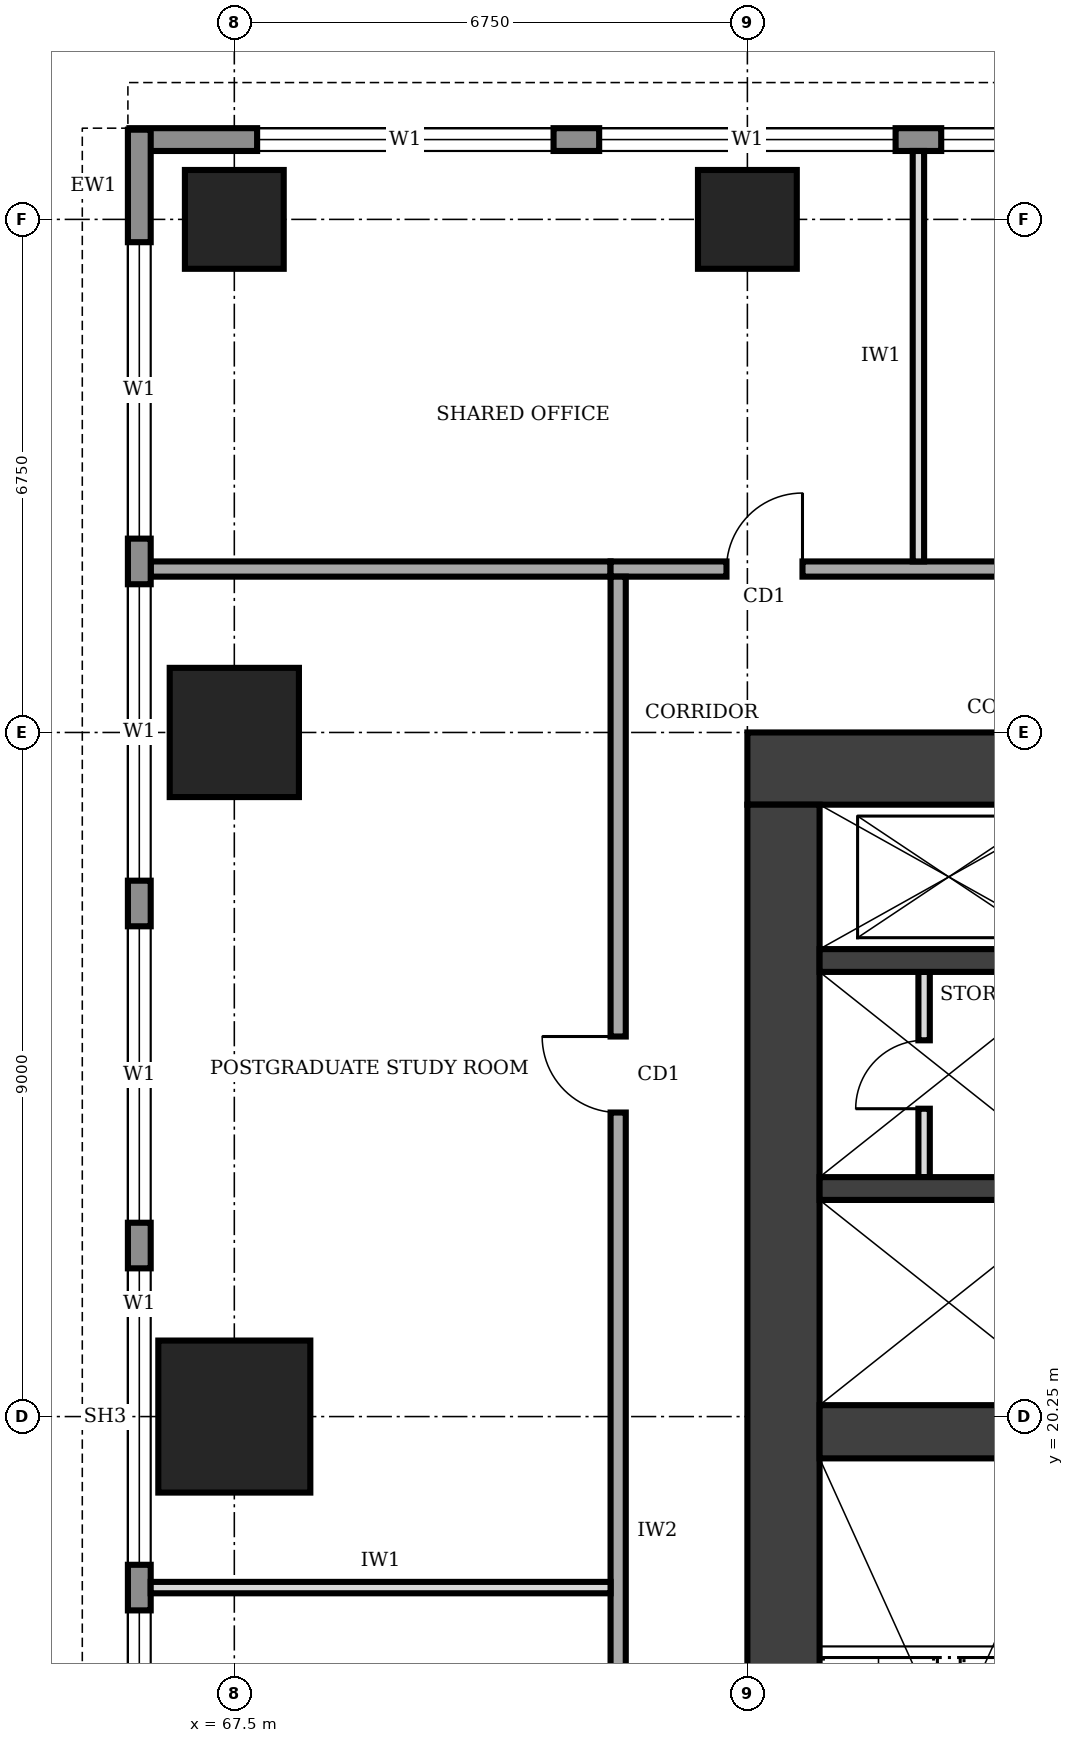
"""IFC4 building model, lengths in metres.
Left out: names, types, materials, properties, quantities, classifications, styles, units other than length and angle.
Written with IfcOpenShell. Run it as: python <this file> out.ifc"""

import sys

from ifc_helpers import new_model, si_unit, direction, frame, frame_2d, origin, origin_2d, place, context, subcontext, project, spatial, rectangle, extrude, element, fill, save


model = new_model("IFC4")
c1 = context("Model", 3, precision=1e-05, world=origin(), true_north=direction((0.0, 1.0)))
c2 = subcontext(c1, "Body", "Model", "MODEL_VIEW")
j1 = project(units=[si_unit("LENGTHUNIT", "METRE"), si_unit("PLANEANGLEUNIT", "RADIAN")], contexts=[c1])
p1 = place(None, origin())
s1 = spatial("IfcSite", under=j1, at=p1, CompositionType="ELEMENT")
p2 = place(p1, origin())
s2 = spatial("IfcBuilding", under=s1, at=p2, CompositionType="ELEMENT")
p3 = place(p2, frame((0.0, 0.0, 205.0)))
s3 = spatial("IfcBuildingStorey", under=s2, at=p3, CompositionType="ELEMENT", Elevation=205.0)
p4 = place(p3, frame((87.75, 28.775, 0.0), z_axis=(0.0, 0.0, 1.0), x_axis=(-1.0, 0.0, 0.0)))
e1 = element("IfcWall", 1, at=p4, inside=s3, PredefinedType="SHEAR", context=c2, shape_type="SweptSolid", body=[
    extrude(rectangle(XDim=13.5, YDim=0.95, at=frame_2d((6.75, 0.0))), origin(), (0.0, 0.0, 1.0), 4.0),
])
p5 = place(p4, frame((4.75, 0.0, 0.0)))
e2 = element("IfcOpeningElement", 2, at=p5, cuts=e1, PredefinedType="OPENING", context=c2, shape_type="SweptSolid", body=[
    extrude(rectangle(XDim=1.8, YDim=2.1, at=frame_2d((0.9, 1.05))), frame((0.0, 0.485, 0.0), z_axis=(0.0, -1.0, 0.0), x_axis=(1.0, 0.0, 0.0)), (0.0, 0.0, 1.0), 0.97),
])
p6 = place(p3, frame((74.725, 28.3, 0.0), z_axis=(0.0, 0.0, 1.0), x_axis=(0.0, -1.0, 0.0)))
e3 = element("IfcWall", 3, at=p6, inside=s3, PredefinedType="SHEAR", context=c2, shape_type="SweptSolid", body=[
    extrude(rectangle(XDim=16.1, YDim=0.95, at=frame_2d((8.05, 0.0))), origin(), (0.0, 0.0, 1.0), 4.0),
])
p7 = place(p3, frame((75.2, 20.05, 0.0), z_axis=(0.0, 0.0, 1.0), x_axis=(1.0, 0.0, 0.0)))
e4 = element("IfcWall", 4, at=p7, inside=s3, PredefinedType="SHEAR", context=c2, shape_type="SweptSolid", body=[
    extrude(rectangle(XDim=3.4, YDim=0.7, at=frame_2d((1.7, 0.0))), origin(), (0.0, 0.0, 1.0), 4.0),
])
for number, where, z_axis, x_axis in (
    (5, (75.2, 23.25, 0.0), (0.0, 0.0, 1.0), (1.0, 0.0, 0.0)),
    (6, (75.2, 26.25, 0.0), (0.0, 0.0, 1.0), (1.0, 0.0, 0.0)),
):
    element("IfcWall", number, at=place(p3, frame(where, z_axis=z_axis, x_axis=x_axis)), inside=s3, PredefinedType="SHEAR", context=c2, shape_type="SweptSolid", body=[
        extrude(rectangle(XDim=3.4, YDim=0.3, at=frame_2d((1.7, 0.0))), origin(), (0.0, 0.0, 1.0), 4.0),
    ])
p8 = place(p3, frame((67.5, 20.25, 0.0), z_axis=(0.0, 0.0, 1.0), x_axis=(1.0, 0.0, 0.0)))
e7 = element("IfcColumn", 7, at=p8, inside=s3, PredefinedType="COLUMN", context=c2, shape_type="SweptSolid", body=[
    extrude(rectangle(XDim=2.0, YDim=2.0, at=origin_2d()), origin(), (0.0, 0.0, 1.0), 4.0),
])
p9 = place(p3, frame((67.5, 29.25, 0.0), z_axis=(0.0, 0.0, 1.0), x_axis=(1.0, 0.0, 0.0)))
e8 = element("IfcColumn", 8, at=p9, inside=s3, PredefinedType="COLUMN", context=c2, shape_type="SweptSolid", body=[
    extrude(rectangle(XDim=1.7, YDim=1.7, at=origin_2d()), origin(), (0.0, 0.0, 1.0), 4.0),
])
for number, where, z_axis, x_axis in (
    (9, (67.5, 36.0, 0.0), (0.0, 0.0, 1.0), (1.0, 0.0, 0.0)),
    (10, (74.25, 36.0, 0.0), (0.0, 0.0, 1.0), (1.0, 0.0, 0.0)),
):
    element("IfcColumn", number, at=place(p3, frame(where, z_axis=z_axis, x_axis=x_axis)), inside=s3, PredefinedType="COLUMN", context=c2, shape_type="SweptSolid", body=[
        extrude(rectangle(XDim=1.3, YDim=1.3, at=origin_2d()), origin(), (0.0, 0.0, 1.0), 4.0),
    ])
p10 = place(p3, frame((96.03, 37.05, 0.0), z_axis=(0.0, 0.0, 1.0), x_axis=(-1.0, 0.0, 0.0)))
e11 = element("IfcWall", 11, at=p10, inside=s3, PredefinedType="STANDARD", context=c2, shape_type="SweptSolid", body=[
    extrude(rectangle(XDim=29.91, YDim=0.3, at=frame_2d((14.955, 0.0))), origin(), (0.0, 0.0, 1.0), 3.75),
])
p11 = place(p10, frame((24.33, 0.0, 0.9)))
e12 = element("IfcOpeningElement", 12, at=p11, cuts=e11, PredefinedType="OPENING", context=c2, shape_type="SweptSolid", body=[
    extrude(rectangle(XDim=3.9, YDim=2.2, at=frame_2d((1.95, 1.1))), frame((0.0, 0.16, 0.0), z_axis=(0.0, -1.0, 0.0), x_axis=(1.0, 0.0, 0.0)), (0.0, 0.0, 1.0), 0.32),
])
p12 = place(p10, frame((19.83, 0.0, 0.9)))
e13 = element("IfcOpeningElement", 13, at=p12, cuts=e11, PredefinedType="OPENING", context=c2, shape_type="SweptSolid", body=[
    extrude(rectangle(XDim=3.9, YDim=2.2, at=frame_2d((1.95, 1.1))), frame((0.0, 0.16, 0.0), z_axis=(0.0, -1.0, 0.0), x_axis=(1.0, 0.0, 0.0)), (0.0, 0.0, 1.0), 0.32),
])
p13 = place(p10, frame((15.33, 0.0, 0.9)))
e14 = element("IfcOpeningElement", 14, at=p13, cuts=e11, PredefinedType="OPENING", context=c2, shape_type="SweptSolid", body=[
    extrude(rectangle(XDim=3.9, YDim=2.2, at=frame_2d((1.95, 1.1))), frame((0.0, 0.16, 0.0), z_axis=(0.0, -1.0, 0.0), x_axis=(1.0, 0.0, 0.0)), (0.0, 0.0, 1.0), 0.32),
])
p14 = place(p10, frame((10.83, 0.0, 0.9)))
e15 = element("IfcOpeningElement", 15, at=p14, cuts=e11, PredefinedType="OPENING", context=c2, shape_type="SweptSolid", body=[
    extrude(rectangle(XDim=3.9, YDim=2.2, at=frame_2d((1.95, 1.1))), frame((0.0, 0.16, 0.0), z_axis=(0.0, -1.0, 0.0), x_axis=(1.0, 0.0, 0.0)), (0.0, 0.0, 1.0), 0.32),
])
p15 = place(p10, frame((6.33, 0.0, 0.9)))
e16 = element("IfcOpeningElement", 16, at=p15, cuts=e11, PredefinedType="OPENING", context=c2, shape_type="SweptSolid", body=[
    extrude(rectangle(XDim=3.9, YDim=2.2, at=frame_2d((1.95, 1.1))), frame((0.0, 0.16, 0.0), z_axis=(0.0, -1.0, 0.0), x_axis=(1.0, 0.0, 0.0)), (0.0, 0.0, 1.0), 0.32),
])
p16 = place(p10, frame((1.83, 0.0, 0.9)))
e17 = element("IfcOpeningElement", 17, at=p16, cuts=e11, PredefinedType="OPENING", context=c2, shape_type="SweptSolid", body=[
    extrude(rectangle(XDim=3.9, YDim=2.2, at=frame_2d((1.95, 1.1))), frame((0.0, 0.16, 0.0), z_axis=(0.0, -1.0, 0.0), x_axis=(1.0, 0.0, 0.0)), (0.0, 0.0, 1.0), 0.32),
])
p17 = place(p3, frame((66.25, 37.18, 0.0), z_axis=(0.0, 0.0, 1.0), x_axis=(0.0, -1.0, 0.0)))
e18 = element("IfcWall", 18, at=p17, inside=s3, PredefinedType="STANDARD", context=c2, shape_type="SweptSolid", body=[
    extrude(rectangle(XDim=33.86, YDim=0.3, at=frame_2d((16.93, 0.0))), origin(), (0.0, 0.0, 1.0), 3.75),
])
p18 = place(p17, frame((28.48, 0.0, 0.9)))
e19 = element("IfcOpeningElement", 19, at=p18, cuts=e18, PredefinedType="OPENING", context=c2, shape_type="SweptSolid", body=[
    extrude(rectangle(XDim=3.9, YDim=2.2, at=frame_2d((1.95, 1.1))), frame((0.0, 0.16, 0.0), z_axis=(0.0, -1.0, 0.0), x_axis=(1.0, 0.0, 0.0)), (0.0, 0.0, 1.0), 0.32),
])
p19 = place(p17, frame((23.98, 0.0, 0.9)))
e20 = element("IfcOpeningElement", 20, at=p19, cuts=e18, PredefinedType="OPENING", context=c2, shape_type="SweptSolid", body=[
    extrude(rectangle(XDim=3.9, YDim=2.2, at=frame_2d((1.95, 1.1))), frame((0.0, 0.16, 0.0), z_axis=(0.0, -1.0, 0.0), x_axis=(1.0, 0.0, 0.0)), (0.0, 0.0, 1.0), 0.32),
])
p20 = place(p17, frame((19.48, 0.0, 0.9)))
e21 = element("IfcOpeningElement", 21, at=p20, cuts=e18, PredefinedType="OPENING", context=c2, shape_type="SweptSolid", body=[
    extrude(rectangle(XDim=3.9, YDim=2.2, at=frame_2d((1.95, 1.1))), frame((0.0, 0.16, 0.0), z_axis=(0.0, -1.0, 0.0), x_axis=(1.0, 0.0, 0.0)), (0.0, 0.0, 1.0), 0.32),
])
p21 = place(p17, frame((14.98, 0.0, 0.9)))
e22 = element("IfcOpeningElement", 22, at=p21, cuts=e18, PredefinedType="OPENING", context=c2, shape_type="SweptSolid", body=[
    extrude(rectangle(XDim=3.9, YDim=2.2, at=frame_2d((1.95, 1.1))), frame((0.0, 0.16, 0.0), z_axis=(0.0, -1.0, 0.0), x_axis=(1.0, 0.0, 0.0)), (0.0, 0.0, 1.0), 0.32),
])
p22 = place(p17, frame((10.48, 0.0, 0.9)))
e23 = element("IfcOpeningElement", 23, at=p22, cuts=e18, PredefinedType="OPENING", context=c2, shape_type="SweptSolid", body=[
    extrude(rectangle(XDim=3.9, YDim=2.2, at=frame_2d((1.95, 1.1))), frame((0.0, 0.16, 0.0), z_axis=(0.0, -1.0, 0.0), x_axis=(1.0, 0.0, 0.0)), (0.0, 0.0, 1.0), 0.32),
])
p23 = place(p17, frame((5.98, 0.0, 0.9)))
e24 = element("IfcOpeningElement", 24, at=p23, cuts=e18, PredefinedType="OPENING", context=c2, shape_type="SweptSolid", body=[
    extrude(rectangle(XDim=3.9, YDim=2.2, at=frame_2d((1.95, 1.1))), frame((0.0, 0.16, 0.0), z_axis=(0.0, -1.0, 0.0), x_axis=(1.0, 0.0, 0.0)), (0.0, 0.0, 1.0), 0.32),
])
p24 = place(p17, frame((1.48, 0.0, 0.9)))
e25 = element("IfcOpeningElement", 25, at=p24, cuts=e18, PredefinedType="OPENING", context=c2, shape_type="SweptSolid", body=[
    extrude(rectangle(XDim=3.9, YDim=2.2, at=frame_2d((1.95, 1.1))), frame((0.0, 0.16, 0.0), z_axis=(0.0, -1.0, 0.0), x_axis=(1.0, 0.0, 0.0)), (0.0, 0.0, 1.0), 0.32),
])
p25 = place(p3, frame((76.575, 23.4, 0.0), z_axis=(0.0, 0.0, 1.0), x_axis=(0.0, 1.0, 0.0)))
e26 = element("IfcWall", 26, at=p25, inside=s3, PredefinedType="PARTITIONING", context=c2, shape_type="SweptSolid", body=[
    extrude(rectangle(XDim=2.7, YDim=0.15, at=frame_2d((1.35, 0.0))), origin(), (0.0, 0.0, 1.0), 3.75),
])
p26 = place(p25, frame((0.9, 0.0, 0.0)))
e27 = element("IfcOpeningElement", 27, at=p26, cuts=e26, PredefinedType="OPENING", context=c2, shape_type="SweptSolid", body=[
    extrude(rectangle(XDim=0.9, YDim=2.1, at=frame_2d((0.45, 1.05))), frame((0.0, 0.085, 0.0), z_axis=(0.0, -1.0, 0.0), x_axis=(1.0, 0.0, 0.0)), (0.0, 0.0, 1.0), 0.17),
])
p27 = place(p3, frame((89.35, 31.4, 0.0), z_axis=(0.0, 0.0, 1.0), x_axis=(-1.0, 0.0, 0.0)))
e28 = element("IfcWall", 28, at=p27, inside=s3, PredefinedType="SOLIDWALL", context=c2, shape_type="SweptSolid", body=[
    extrude(rectangle(XDim=16.9, YDim=0.2, at=frame_2d((8.45, 0.0))), origin(), (0.0, 0.0, 1.0), 3.75),
])
p28 = place(p27, frame((14.375, 0.0, 0.0)))
e29 = element("IfcOpeningElement", 29, at=p28, cuts=e28, PredefinedType="OPENING", context=c2, shape_type="SweptSolid", body=[
    extrude(rectangle(XDim=1.0, YDim=2.1, at=frame_2d((0.5, 1.05))), frame((0.0, 0.11, 0.0), z_axis=(0.0, -1.0, 0.0), x_axis=(1.0, 0.0, 0.0)), (0.0, 0.0, 1.0), 0.22),
])
p29 = place(p27, frame((10.1, 0.0, 0.0)))
e30 = element("IfcOpeningElement", 30, at=p29, cuts=e28, PredefinedType="OPENING", context=c2, shape_type="SweptSolid", body=[
    extrude(rectangle(XDim=1.0, YDim=2.1, at=frame_2d((0.5, 1.05))), frame((0.0, 0.11, 0.0), z_axis=(0.0, -1.0, 0.0), x_axis=(1.0, 0.0, 0.0)), (0.0, 0.0, 1.0), 0.22),
])
p30 = place(p3, frame((72.55, 31.3, 0.0), z_axis=(0.0, 0.0, 1.0), x_axis=(0.0, -1.0, 0.0)))
e31 = element("IfcWall", 31, at=p30, inside=s3, PredefinedType="SOLIDWALL", context=c2, shape_type="SweptSolid", body=[
    extrude(rectangle(XDim=23.8, YDim=0.2, at=frame_2d((11.9, 0.0))), origin(), (0.0, 0.0, 1.0), 3.75),
])
p31 = place(p30, frame((18.05, 0.0, 0.0)))
e32 = element("IfcOpeningElement", 32, at=p31, cuts=e31, PredefinedType="OPENING", context=c2, shape_type="SweptSolid", body=[
    extrude(rectangle(XDim=1.0, YDim=2.1, at=frame_2d((0.5, 1.05))), frame((0.0, 0.11, 0.0), z_axis=(0.0, -1.0, 0.0), x_axis=(1.0, 0.0, 0.0)), (0.0, 0.0, 1.0), 0.22),
])
p32 = place(p30, frame((6.05, 0.0, 0.0)))
e33 = element("IfcOpeningElement", 33, at=p32, cuts=e31, PredefinedType="OPENING", context=c2, shape_type="SweptSolid", body=[
    extrude(rectangle(XDim=1.0, YDim=2.1, at=frame_2d((0.5, 1.05))), frame((0.0, 0.11, 0.0), z_axis=(0.0, -1.0, 0.0), x_axis=(1.0, 0.0, 0.0)), (0.0, 0.0, 1.0), 0.22),
])
p33 = place(p3, frame((66.4, 31.4, 0.0), z_axis=(0.0, 0.0, 1.0), x_axis=(1.0, 0.0, 0.0)))
e34 = element("IfcWall", 34, at=p33, inside=s3, PredefinedType="SOLIDWALL", context=c2, shape_type="SweptSolid", body=[
    extrude(rectangle(XDim=6.05, YDim=0.2, at=frame_2d((3.025, 0.0))), origin(), (0.0, 0.0, 1.0), 3.75),
])
p34 = place(p3, frame((76.5, 31.5, 0.0), z_axis=(0.0, 0.0, 1.0), x_axis=(0.0, 1.0, 0.0)))
e35 = element("IfcWall", 35, at=p34, inside=s3, PredefinedType="PARTITIONING", context=c2, shape_type="SweptSolid", body=[
    extrude(rectangle(XDim=5.4, YDim=0.15, at=frame_2d((2.7, 0.0))), origin(), (0.0, 0.0, 1.0), 3.75),
])
p35 = place(p3, frame((66.4, 18.0, 0.0), z_axis=(0.0, 0.0, 1.0), x_axis=(1.0, 0.0, 0.0)))
e36 = element("IfcWall", 36, at=p35, inside=s3, PredefinedType="PARTITIONING", context=c2, shape_type="SweptSolid", body=[
    extrude(rectangle(XDim=6.05, YDim=0.15, at=frame_2d((3.025, 0.0))), origin(), (0.0, 0.0, 1.0), 3.75),
])
p36 = place(p11, origin())
e37 = element("IfcWindow", 37, at=p36, inside=s3, PartitioningType="SINGLE_PANEL", PredefinedType="WINDOW", context=c2, shape_type="SweptSolid", body=[
    extrude(rectangle(XDim=3.9, YDim=2.2, at=frame_2d((1.95, 1.1))), frame((0.0, 0.03, 0.0), z_axis=(0.0, -1.0, 0.0), x_axis=(1.0, 0.0, 0.0)), (0.0, 0.0, 1.0), 0.06),
])
fill(e12, e37)
p37 = place(p12, origin())
e38 = element("IfcWindow", 38, at=p37, inside=s3, PartitioningType="SINGLE_PANEL", PredefinedType="WINDOW", context=c2, shape_type="SweptSolid", body=[
    extrude(rectangle(XDim=3.9, YDim=2.2, at=frame_2d((1.95, 1.1))), frame((0.0, 0.03, 0.0), z_axis=(0.0, -1.0, 0.0), x_axis=(1.0, 0.0, 0.0)), (0.0, 0.0, 1.0), 0.06),
])
fill(e13, e38)
p38 = place(p13, origin())
e39 = element("IfcWindow", 39, at=p38, inside=s3, PartitioningType="SINGLE_PANEL", PredefinedType="WINDOW", context=c2, shape_type="SweptSolid", body=[
    extrude(rectangle(XDim=3.9, YDim=2.2, at=frame_2d((1.95, 1.1))), frame((0.0, 0.03, 0.0), z_axis=(0.0, -1.0, 0.0), x_axis=(1.0, 0.0, 0.0)), (0.0, 0.0, 1.0), 0.06),
])
fill(e14, e39)
p39 = place(p20, origin())
e40 = element("IfcWindow", 40, at=p39, inside=s3, PartitioningType="SINGLE_PANEL", PredefinedType="WINDOW", context=c2, shape_type="SweptSolid", body=[
    extrude(rectangle(XDim=3.9, YDim=2.2, at=frame_2d((1.95, 1.1))), frame((0.0, 0.03, 0.0), z_axis=(0.0, -1.0, 0.0), x_axis=(1.0, 0.0, 0.0)), (0.0, 0.0, 1.0), 0.06),
])
fill(e21, e40)
p40 = place(p21, origin())
e41 = element("IfcWindow", 41, at=p40, inside=s3, PartitioningType="SINGLE_PANEL", PredefinedType="WINDOW", context=c2, shape_type="SweptSolid", body=[
    extrude(rectangle(XDim=3.9, YDim=2.2, at=frame_2d((1.95, 1.1))), frame((0.0, 0.03, 0.0), z_axis=(0.0, -1.0, 0.0), x_axis=(1.0, 0.0, 0.0)), (0.0, 0.0, 1.0), 0.06),
])
fill(e22, e41)
p41 = place(p22, origin())
e42 = element("IfcWindow", 42, at=p41, inside=s3, PartitioningType="SINGLE_PANEL", PredefinedType="WINDOW", context=c2, shape_type="SweptSolid", body=[
    extrude(rectangle(XDim=3.9, YDim=2.2, at=frame_2d((1.95, 1.1))), frame((0.0, 0.03, 0.0), z_axis=(0.0, -1.0, 0.0), x_axis=(1.0, 0.0, 0.0)), (0.0, 0.0, 1.0), 0.06),
])
fill(e23, e42)
p42 = place(p23, origin())
e43 = element("IfcWindow", 43, at=p42, inside=s3, PartitioningType="SINGLE_PANEL", PredefinedType="WINDOW", context=c2, shape_type="SweptSolid", body=[
    extrude(rectangle(XDim=3.9, YDim=2.2, at=frame_2d((1.95, 1.1))), frame((0.0, 0.03, 0.0), z_axis=(0.0, -1.0, 0.0), x_axis=(1.0, 0.0, 0.0)), (0.0, 0.0, 1.0), 0.06),
])
fill(e24, e43)
p43 = place(p24, origin())
e44 = element("IfcWindow", 44, at=p43, inside=s3, PartitioningType="SINGLE_PANEL", PredefinedType="WINDOW", context=c2, shape_type="SweptSolid", body=[
    extrude(rectangle(XDim=3.9, YDim=2.2, at=frame_2d((1.95, 1.1))), frame((0.0, 0.03, 0.0), z_axis=(0.0, -1.0, 0.0), x_axis=(1.0, 0.0, 0.0)), (0.0, 0.0, 1.0), 0.06),
])
fill(e25, e44)
p44 = place(p26, origin())
e45 = element("IfcDoor", 45, at=p44, inside=s3, OperationType="SINGLE_SWING_LEFT", PredefinedType="DOOR", context=c2, shape_type="SweptSolid", body=[
    extrude(rectangle(XDim=0.9, YDim=2.1, at=frame_2d((0.45, 1.05))), frame((0.0, 0.025, 0.0), z_axis=(0.0, -1.0, 0.0), x_axis=(1.0, 0.0, 0.0)), (0.0, 0.0, 1.0), 0.05),
])
fill(e27, e45)
p45 = place(p28, frame((1.0, 0.0, 0.0), z_axis=(0.0, 0.0, 1.0), x_axis=(-1.0, 0.0, 0.0)))
e46 = element("IfcDoor", 46, at=p45, inside=s3, OperationType="SINGLE_SWING_RIGHT", PredefinedType="DOOR", context=c2, shape_type="SweptSolid", body=[
    extrude(rectangle(XDim=1.0, YDim=2.1, at=frame_2d((0.5, 1.05))), frame((0.0, 0.025, 0.0), z_axis=(0.0, -1.0, 0.0), x_axis=(1.0, 0.0, 0.0)), (0.0, 0.0, 1.0), 0.05),
])
fill(e29, e46)
p46 = place(p32, frame((1.0, 0.0, 0.0), z_axis=(0.0, 0.0, 1.0), x_axis=(-1.0, 0.0, 0.0)))
e47 = element("IfcDoor", 47, at=p46, inside=s3, OperationType="SINGLE_SWING_RIGHT", PredefinedType="DOOR", context=c2, shape_type="SweptSolid", body=[
    extrude(rectangle(XDim=1.0, YDim=2.1, at=frame_2d((0.5, 1.05))), frame((0.0, 0.025, 0.0), z_axis=(0.0, -1.0, 0.0), x_axis=(1.0, 0.0, 0.0)), (0.0, 0.0, 1.0), 0.05),
])
fill(e33, e47)
save(model, sys.argv[1])
